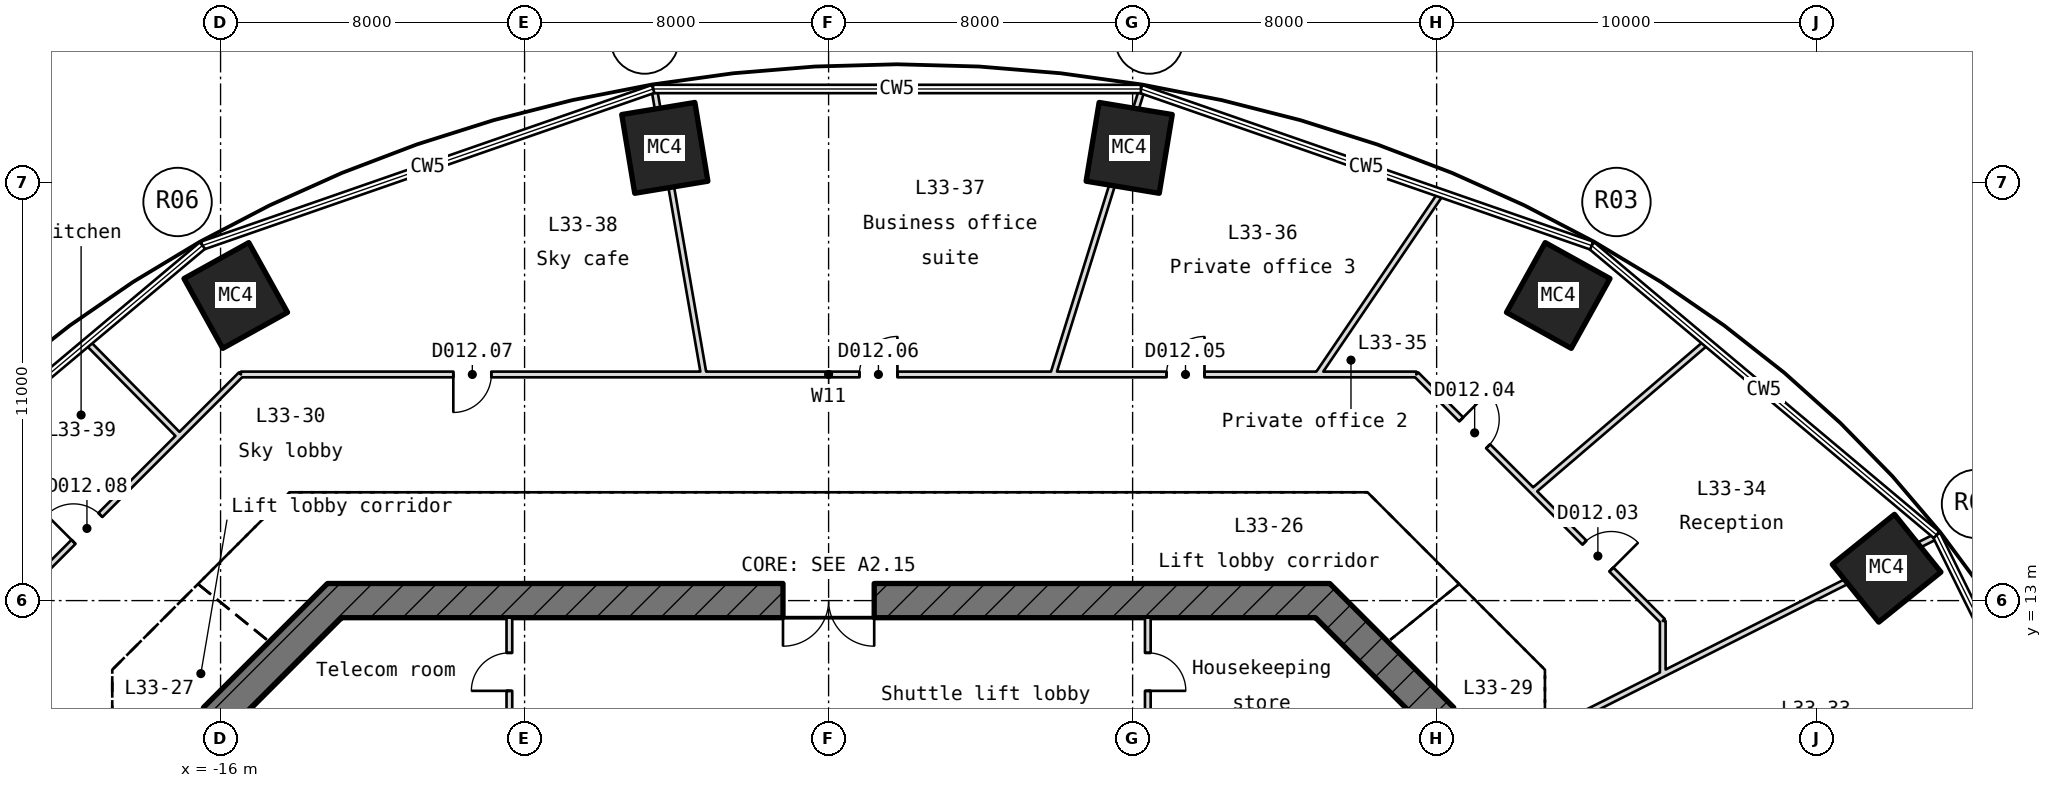
"""IFC4 building model, lengths in metres.
Left out: names, types, materials, properties, quantities, classifications, styles, units other than length and angle.
Written with IfcOpenShell. Run it as: python <this file> out.ifc"""

import sys

from ifc_helpers import new_model, si_unit, direction, frame, frame_2d, origin, origin_2d, place, context, subcontext, project, spatial, rectangle, hollow_rectangle, extrude, element, fill, save


model = new_model("IFC4")
c1 = context("Model", 3, precision=1e-05, world=origin(), true_north=direction((0.0, 1.0)))
c2 = subcontext(c1, "Body", "Model", "MODEL_VIEW")
j1 = project(units=[si_unit("LENGTHUNIT", "METRE"), si_unit("PLANEANGLEUNIT", "RADIAN")], contexts=[c1])
p1 = place(None, origin())
s1 = spatial("IfcSite", under=j1, at=p1, CompositionType="ELEMENT")
p2 = place(p1, origin())
s2 = spatial("IfcBuilding", under=s1, at=p2, CompositionType="ELEMENT")
p3 = place(p2, frame((0.0, 0.0, 155.65)))
s3 = spatial("IfcBuildingStorey", under=s2, at=p3, CompositionType="ELEMENT", Elevation=155.65)
for number, where, z_axis, x_axis in (
    (1, (27.841, 13.852, -0.25), (0.0, 0.0, 1.0), (0.627, -0.779, 0.0)),
    (2, (19.2, 21.028, -0.25), (0.0, 0.0, 1.0), (0.874, -0.485, 0.0)),
    (3, (7.91, 24.912, -0.25), (0.0, 0.0, 1.0), (0.987, -0.163, 0.0)),
    (4, (-4.31, 24.912, -0.25), (0.0, 0.0, 1.0), (0.987, 0.163, 0.0)),
    (5, (-15.6, 21.028, -0.25), (0.0, 0.0, 1.0), (0.874, 0.485, 0.0)),
):
    element("IfcColumn", number, at=place(p3, frame(where, z_axis=z_axis, x_axis=x_axis)), inside=s3, PredefinedType="COLUMN", context=c2, shape_type="SweptSolid", body=[
        extrude(hollow_rectangle(XDim=1.95, YDim=2.1, WallThickness=0.075, at=origin_2d()), origin(), (0.0, 0.0, 1.0), 5.47),
    ])
p4 = place(p3, frame((16.0, -10.186, -0.25), z_axis=(0.0, 0.0, 1.0), x_axis=(0.0, 1.0, 0.0)))
e6 = element("IfcWall", 6, at=p4, inside=s3, PredefinedType="SHEAR", context=c2, shape_type="SweptSolid", body=[
    extrude(rectangle(XDim=20.373, YDim=0.9, at=frame_2d((10.186, 0.0))), origin(), (0.0, 0.0, 1.0), 5.47),
])
p5 = place(p4, frame((8.986, 0.0, 0.25)))
e7 = element("IfcOpeningElement", 7, at=p5, cuts=e6, PredefinedType="OPENING", context=c2, shape_type="SweptSolid", body=[
    extrude(rectangle(XDim=2.4, YDim=2.1, at=frame_2d((1.2, 1.05))), frame((0.0, 0.46, 0.0), z_axis=(0.0, -1.0, 0.0), x_axis=(1.0, 0.0, 0.0)), (0.0, 0.0, 1.0), 0.92),
])
p6 = place(p4, frame((13.586, 0.0, 0.25)))
e8 = element("IfcOpeningElement", 8, at=p6, cuts=e6, PredefinedType="OPENING", context=c2, shape_type="SweptSolid", body=[
    extrude(rectangle(XDim=1.2, YDim=2.1, at=frame_2d((0.6, 1.05))), frame((0.0, 0.46, 0.0), z_axis=(0.0, -1.0, 0.0), x_axis=(1.0, 0.0, 0.0)), (0.0, 0.0, 1.0), 0.92),
])
p7 = place(p3, frame((16.132, 9.868, -0.25), z_axis=(0.0, 0.0, 1.0), x_axis=(-0.707106781187, 0.707106781187, 0.0)))
e9 = element("IfcWall", 9, at=p7, inside=s3, PredefinedType="SHEAR", context=c2, shape_type="SweptSolid", body=[
    extrude(rectangle(XDim=4.615, YDim=0.9, at=frame_2d((2.308, 0.0))), origin(), (0.0, 0.0, 1.0), 5.47),
])
p8 = place(p3, frame((13.186, 13.0, -0.25), z_axis=(0.0, 0.0, 1.0), x_axis=(-1.0, 0.0, 0.0)))
e10 = element("IfcWall", 10, at=p8, inside=s3, PredefinedType="SHEAR", context=c2, shape_type="SweptSolid", body=[
    extrude(rectangle(XDim=26.373, YDim=0.9, at=frame_2d((13.186, 0.0))), origin(), (0.0, 0.0, 1.0), 5.47),
])
p9 = place(p8, frame((11.986, 0.0, 0.25)))
e11 = element("IfcOpeningElement", 11, at=p9, cuts=e10, PredefinedType="OPENING", context=c2, shape_type="SweptSolid", body=[
    extrude(rectangle(XDim=2.4, YDim=2.1, at=frame_2d((1.2, 1.05))), frame((0.0, 0.46, 0.0), z_axis=(0.0, -1.0, 0.0), x_axis=(1.0, 0.0, 0.0)), (0.0, 0.0, 1.0), 0.92),
])
p10 = place(p3, frame((-12.868, 13.132, -0.25), z_axis=(0.0, 0.0, 1.0), x_axis=(-0.707106781187, -0.707106781187, 0.0)))
e12 = element("IfcWall", 12, at=p10, inside=s3, PredefinedType="SHEAR", context=c2, shape_type="SweptSolid", body=[
    extrude(rectangle(XDim=4.615, YDim=0.9, at=frame_2d((2.308, 0.0))), origin(), (0.0, 0.0, 1.0), 5.47),
])
p11 = place(p3, frame((-16.0, 10.186, -0.25), z_axis=(0.0, 0.0, 1.0), x_axis=(0.0, -1.0, 0.0)))
e13 = element("IfcWall", 13, at=p11, inside=s3, PredefinedType="SHEAR", context=c2, shape_type="SweptSolid", body=[
    extrude(rectangle(XDim=20.373, YDim=0.9, at=frame_2d((10.186, 0.0))), origin(), (0.0, 0.0, 1.0), 5.47),
])
p12 = place(p11, frame((8.986, 0.0, 0.25)))
e14 = element("IfcOpeningElement", 14, at=p12, cuts=e13, PredefinedType="OPENING", context=c2, shape_type="SweptSolid", body=[
    extrude(rectangle(XDim=2.4, YDim=2.1, at=frame_2d((1.2, 1.05))), frame((0.0, 0.46, 0.0), z_axis=(0.0, -1.0, 0.0), x_axis=(1.0, 0.0, 0.0)), (0.0, 0.0, 1.0), 0.92),
])
p13 = place(p11, frame((5.586, 0.0, 0.25)))
e15 = element("IfcOpeningElement", 15, at=p13, cuts=e13, PredefinedType="OPENING", context=c2, shape_type="SweptSolid", body=[
    extrude(rectangle(XDim=1.2, YDim=2.1, at=frame_2d((0.6, 1.05))), frame((0.0, 0.46, 0.0), z_axis=(0.0, -1.0, 0.0), x_axis=(1.0, 0.0, 0.0)), (0.0, 0.0, 1.0), 0.92),
])
p14 = place(p3, frame((-8.4, 9.7, 0.0), z_axis=(0.0, 0.0, 1.0), x_axis=(0.0, 1.0, 0.0)))
e16 = element("IfcWall", 16, at=p14, inside=s3, PredefinedType="PARTITIONING", context=c2, shape_type="SweptSolid", body=[
    extrude(rectangle(XDim=2.85, YDim=0.15, at=frame_2d((1.425, 0.0))), origin(), (0.0, 0.0, 1.0), 5.22),
])
p15 = place(p14, frame((0.925, 0.0, 0.0)))
e17 = element("IfcOpeningElement", 17, at=p15, cuts=e16, PredefinedType="OPENING", context=c2, shape_type="SweptSolid", body=[
    extrude(rectangle(XDim=1.0, YDim=2.1, at=frame_2d((0.5, 1.05))), frame((0.0, 0.085, 0.0), z_axis=(0.0, -1.0, 0.0), x_axis=(1.0, 0.0, 0.0)), (0.0, 0.0, 1.0), 0.17),
])
p16 = place(p3, frame((8.4, 9.7, 0.0), z_axis=(0.0, 0.0, 1.0), x_axis=(0.0, 1.0, 0.0)))
e18 = element("IfcWall", 18, at=p16, inside=s3, PredefinedType="PARTITIONING", context=c2, shape_type="SweptSolid", body=[
    extrude(rectangle(XDim=2.85, YDim=0.15, at=frame_2d((1.425, 0.0))), origin(), (0.0, 0.0, 1.0), 5.22),
])
p17 = place(p16, frame((0.925, 0.0, 0.0)))
e19 = element("IfcOpeningElement", 19, at=p17, cuts=e18, PredefinedType="OPENING", context=c2, shape_type="SweptSolid", body=[
    extrude(rectangle(XDim=1.0, YDim=2.1, at=frame_2d((0.5, 1.05))), frame((0.0, 0.085, 0.0), z_axis=(0.0, -1.0, 0.0), x_axis=(1.0, 0.0, 0.0)), (0.0, 0.0, 1.0), 0.17),
])
p18 = place(p3, frame((-15.465, 18.95, 0.0), z_axis=(0.0, 0.0, 1.0), x_axis=(1.0, 0.0, 0.0)))
e20 = element("IfcWall", 20, at=p18, inside=s3, PredefinedType="PARTITIONING", context=c2, shape_type="SweptSolid", body=[
    extrude(rectangle(XDim=30.929, YDim=0.15, at=frame_2d((15.465, 0.0))), origin(), (0.0, 0.0, 1.0), 5.22),
])
p19 = place(p18, frame((24.356, 0.0, 0.0)))
e21 = element("IfcOpeningElement", 21, at=p19, cuts=e20, PredefinedType="OPENING", context=c2, shape_type="SweptSolid", body=[
    extrude(rectangle(XDim=1.0, YDim=2.1, at=frame_2d((0.5, 1.05))), frame((0.0, 0.085, 0.0), z_axis=(0.0, -1.0, 0.0), x_axis=(1.0, 0.0, 0.0)), (0.0, 0.0, 1.0), 0.17),
])
p20 = place(p18, frame((16.276, 0.0, 0.0)))
e22 = element("IfcOpeningElement", 22, at=p20, cuts=e20, PredefinedType="OPENING", context=c2, shape_type="SweptSolid", body=[
    extrude(rectangle(XDim=1.0, YDim=2.1, at=frame_2d((0.5, 1.05))), frame((0.0, 0.085, 0.0), z_axis=(0.0, -1.0, 0.0), x_axis=(1.0, 0.0, 0.0)), (0.0, 0.0, 1.0), 0.17),
])
p21 = place(p18, frame((5.589, 0.0, 0.0)))
e23 = element("IfcOpeningElement", 23, at=p21, cuts=e20, PredefinedType="OPENING", context=c2, shape_type="SweptSolid", body=[
    extrude(rectangle(XDim=1.0, YDim=2.1, at=frame_2d((0.5, 1.05))), frame((0.0, 0.085, 0.0), z_axis=(0.0, -1.0, 0.0), x_axis=(1.0, 0.0, 0.0)), (0.0, 0.0, 1.0), 0.17),
])
p22 = place(p3, frame((18.85, 9.502, 0.0), z_axis=(0.0, 0.0, 1.0), x_axis=(0.892969898895, 0.450116384579, 0.0)))
e24 = element("IfcWall", 24, at=p22, inside=s3, PredefinedType="PARTITIONING", context=c2, shape_type="SweptSolid", body=[
    extrude(rectangle(XDim=9.412, YDim=0.15, at=frame_2d((4.706, 0.0))), origin(), (0.0, 0.0, 1.0), 4.608),
])
p23 = place(p3, frame((27.255, 13.738, 0.0), z_axis=(0.0, 0.0, 1.0), x_axis=(0.892996055484, 0.4500644897, 0.0)))
e25 = element("IfcWall", 25, at=p23, inside=s3, PredefinedType="PARTITIONING", context=c2, shape_type="SweptSolid", body=[
    extrude(rectangle(XDim=2.122, YDim=0.15, at=frame_2d((1.061, 0.0))), origin(), (0.0, 0.0, 1.0), 5.22),
])
p24 = place(p3, frame((18.536, 15.879, 0.0), z_axis=(0.0, 0.0, 1.0), x_axis=(0.759417316623, 0.650603826621, 0.0)))
e26 = element("IfcWall", 26, at=p24, inside=s3, PredefinedType="PARTITIONING", context=c2, shape_type="SweptSolid", body=[
    extrude(rectangle(XDim=6.004, YDim=0.15, at=frame_2d((3.002, 0.0))), origin(), (0.0, 0.0, 1.0), 5.22),
])
p25 = place(p3, frame((-21.95, 12.465, 0.0), z_axis=(0.0, 0.0, 1.0), x_axis=(0.707106781187, 0.707106781187, 0.0)))
e27 = element("IfcWall", 27, at=p25, inside=s3, PredefinedType="PARTITIONING", context=c2, shape_type="SweptSolid", body=[
    extrude(rectangle(XDim=9.172, YDim=0.15, at=frame_2d((4.586, 0.0))), origin(), (0.0, 0.0, 1.0), 5.22),
])
p26 = place(p25, frame((2.942, 0.0, 0.0)))
e28 = element("IfcOpeningElement", 28, at=p26, cuts=e27, PredefinedType="OPENING", context=c2, shape_type="SweptSolid", body=[
    extrude(rectangle(XDim=1.0, YDim=2.1, at=frame_2d((0.5, 1.05))), frame((0.0, 0.085, 0.0), z_axis=(0.0, -1.0, 0.0), x_axis=(1.0, 0.0, 0.0)), (0.0, 0.0, 1.0), 0.17),
])
p27 = place(p3, frame((12.875, 18.95, 0.0), z_axis=(0.0, 0.0, 1.0), x_axis=(0.561985643587, 0.827146985971, 0.0)))
e29 = element("IfcWall", 29, at=p27, inside=s3, PredefinedType="PARTITIONING", context=c2, shape_type="SweptSolid", body=[
    extrude(rectangle(XDim=5.744, YDim=0.15, at=frame_2d((2.872, 0.0))), origin(), (0.0, 0.0, 1.0), 5.22),
])
p28 = place(p3, frame((5.908, 18.95, 0.0), z_axis=(0.0, 0.0, 1.0), x_axis=(0.297612327445, 0.95468680862, 0.0)))
e30 = element("IfcWall", 30, at=p28, inside=s3, PredefinedType="PARTITIONING", context=c2, shape_type="SweptSolid", body=[
    extrude(rectangle(XDim=5.728, YDim=0.15, at=frame_2d((2.864, 0.0))), origin(), (0.0, 0.0, 1.0), 4.676),
])
p29 = place(p3, frame((7.613, 24.418, 0.0), z_axis=(0.0, 0.0, 1.0), x_axis=(0.297636028927, 0.95467941964, 0.0)))
e31 = element("IfcWall", 31, at=p29, inside=s3, PredefinedType="PARTITIONING", context=c2, shape_type="SweptSolid", body=[
    extrude(rectangle(XDim=2.111, YDim=0.15, at=frame_2d((1.055, 0.0))), origin(), (0.0, 0.0, 1.0), 5.22),
])
p30 = place(p3, frame((21.95, 11.064, 0.0), z_axis=(0.0, 0.0, 1.0), x_axis=(0.0, 1.0, 0.0)))
e32 = element("IfcWall", 32, at=p30, inside=s3, PredefinedType="PARTITIONING", context=c2, shape_type="SweptSolid", body=[
    extrude(rectangle(XDim=1.4, YDim=0.15, at=frame_2d((0.7, 0.0))), origin(), (0.0, 0.0, 1.0), 5.22),
])
p31 = place(p3, frame((-3.286, 18.95, 0.0), z_axis=(0.0, 0.0, 1.0), x_axis=(-0.170824075094, 0.9853015454, 0.0)))
e33 = element("IfcWall", 33, at=p31, inside=s3, PredefinedType="PARTITIONING", context=c2, shape_type="SweptSolid", body=[
    extrude(rectangle(XDim=5.5, YDim=0.15, at=frame_2d((2.75, 0.0))), origin(), (0.0, 0.0, 1.0), 4.676),
])
p32 = place(p3, frame((-4.225, 24.369, 0.0), z_axis=(0.0, 0.0, 1.0), x_axis=(-0.170792731179, 0.985306979056, 0.0)))
e34 = element("IfcWall", 34, at=p32, inside=s3, PredefinedType="PARTITIONING", context=c2, shape_type="SweptSolid", body=[
    extrude(rectangle(XDim=2.104, YDim=0.15, at=frame_2d((1.052, 0.0))), origin(), (0.0, 0.0, 1.0), 5.22),
])
p33 = place(p3, frame((-17.082, 17.333, 0.0), z_axis=(0.0, 0.0, 1.0), x_axis=(-0.701943933614, 0.712232205157, 0.0)))
e35 = element("IfcWall", 35, at=p33, inside=s3, PredefinedType="PARTITIONING", context=c2, shape_type="SweptSolid", body=[
    extrude(rectangle(XDim=3.441, YDim=0.15, at=frame_2d((1.72, 0.0))), origin(), (0.0, 0.0, 1.0), 5.22),
])
p34 = place(p3, frame((21.95, 12.465, 0.0), z_axis=(0.0, 0.0, 1.0), x_axis=(-0.707106781187, 0.707106781187, 0.0)))
e36 = element("IfcWall", 36, at=p34, inside=s3, PredefinedType="PARTITIONING", context=c2, shape_type="SweptSolid", body=[
    extrude(rectangle(XDim=9.172, YDim=0.15, at=frame_2d((4.586, 0.0))), origin(), (0.0, 0.0, 1.0), 5.22),
])
p35 = place(p34, frame((1.914, 0.0, 0.0)))
e37 = element("IfcOpeningElement", 37, at=p35, cuts=e36, PredefinedType="OPENING", context=c2, shape_type="SweptSolid", body=[
    extrude(rectangle(XDim=1.0, YDim=2.1, at=frame_2d((0.5, 1.05))), frame((0.0, 0.085, 0.0), z_axis=(0.0, -1.0, 0.0), x_axis=(1.0, 0.0, 0.0)), (0.0, 0.0, 1.0), 0.17),
])
p36 = place(p34, frame((6.5, 0.0, 0.0)))
e38 = element("IfcOpeningElement", 38, at=p36, cuts=e36, PredefinedType="OPENING", context=c2, shape_type="SweptSolid", body=[
    extrude(rectangle(XDim=1.0, YDim=2.1, at=frame_2d((0.5, 1.05))), frame((0.0, 0.085, 0.0), z_axis=(0.0, -1.0, 0.0), x_axis=(1.0, 0.0, 0.0)), (0.0, 0.0, 1.0), 0.17),
])
p37 = place(p3, frame((-18.85, 7.905, 0.0), z_axis=(0.0, 0.0, 1.0), x_axis=(-0.922196281158, 0.386722147049, 0.0)))
e39 = element("IfcWall", 39, at=p37, inside=s3, PredefinedType="PARTITIONING", context=c2, shape_type="SweptSolid", body=[
    extrude(rectangle(XDim=7.394, YDim=0.15, at=frame_2d((3.697, 0.0))), origin(), (0.0, 0.0, 1.0), 4.684),
])
p38 = place(p9, origin())
e40 = element("IfcDoor", 40, at=p38, inside=s3, OperationType="DOUBLE_DOOR_SINGLE_SWING", PredefinedType="DOOR", context=c2, shape_type="SweptSolid", body=[
    extrude(rectangle(XDim=2.4, YDim=2.1, at=frame_2d((1.2, 1.05))), frame((0.0, 0.025, 0.0), z_axis=(0.0, -1.0, 0.0), x_axis=(1.0, 0.0, 0.0)), (0.0, 0.0, 1.0), 0.05),
])
fill(e11, e40)
p39 = place(p15, origin())
e41 = element("IfcDoor", 41, at=p39, inside=s3, OperationType="SINGLE_SWING_RIGHT", PredefinedType="DOOR", context=c2, shape_type="SweptSolid", body=[
    extrude(rectangle(XDim=1.0, YDim=2.1, at=frame_2d((0.5, 1.05))), frame((0.0, 0.025, 0.0), z_axis=(0.0, -1.0, 0.0), x_axis=(1.0, 0.0, 0.0)), (0.0, 0.0, 1.0), 0.05),
])
fill(e17, e41)
p40 = place(p17, frame((1.0, 0.0, 0.0), z_axis=(0.0, 0.0, 1.0), x_axis=(-1.0, 0.0, 0.0)))
e42 = element("IfcDoor", 42, at=p40, inside=s3, OperationType="SINGLE_SWING_LEFT", PredefinedType="DOOR", context=c2, shape_type="SweptSolid", body=[
    extrude(rectangle(XDim=1.0, YDim=2.1, at=frame_2d((0.5, 1.05))), frame((0.0, 0.025, 0.0), z_axis=(0.0, -1.0, 0.0), x_axis=(1.0, 0.0, 0.0)), (0.0, 0.0, 1.0), 0.05),
])
fill(e19, e42)
p41 = place(p35, frame((1.0, 0.0, 0.0), z_axis=(0.0, 0.0, 1.0), x_axis=(-1.0, 0.0, 0.0)))
e43 = element("IfcDoor", 43, at=p41, inside=s3, OperationType="SINGLE_SWING_LEFT", PredefinedType="DOOR", context=c2, shape_type="SweptSolid", body=[
    extrude(rectangle(XDim=1.0, YDim=2.1, at=frame_2d((0.5, 1.05))), frame((0.0, 0.025, 0.0), z_axis=(0.0, -1.0, 0.0), x_axis=(1.0, 0.0, 0.0)), (0.0, 0.0, 1.0), 0.05),
])
fill(e37, e43)
p42 = place(p36, frame((1.0, 0.0, 0.0), z_axis=(0.0, 0.0, 1.0), x_axis=(-1.0, 0.0, 0.0)))
e44 = element("IfcDoor", 44, at=p42, inside=s3, OperationType="SINGLE_SWING_LEFT", PredefinedType="DOOR", context=c2, shape_type="SweptSolid", body=[
    extrude(rectangle(XDim=1.0, YDim=2.1, at=frame_2d((0.5, 1.05))), frame((0.0, 0.025, 0.0), z_axis=(0.0, -1.0, 0.0), x_axis=(1.0, 0.0, 0.0)), (0.0, 0.0, 1.0), 0.05),
])
fill(e38, e44)
p43 = place(p19, origin())
e45 = element("IfcDoor", 45, at=p43, inside=s3, OperationType="SINGLE_SWING_RIGHT", PredefinedType="DOOR", context=c2, shape_type="SweptSolid", body=[
    extrude(rectangle(XDim=1.0, YDim=2.1, at=frame_2d((0.5, 1.05))), frame((0.0, 0.025, 0.0), z_axis=(0.0, -1.0, 0.0), x_axis=(1.0, 0.0, 0.0)), (0.0, 0.0, 1.0), 0.05),
])
fill(e21, e45)
p44 = place(p20, origin())
e46 = element("IfcDoor", 46, at=p44, inside=s3, OperationType="SINGLE_SWING_RIGHT", PredefinedType="DOOR", context=c2, shape_type="SweptSolid", body=[
    extrude(rectangle(XDim=1.0, YDim=2.1, at=frame_2d((0.5, 1.05))), frame((0.0, 0.025, 0.0), z_axis=(0.0, -1.0, 0.0), x_axis=(1.0, 0.0, 0.0)), (0.0, 0.0, 1.0), 0.05),
])
fill(e22, e46)
p45 = place(p21, frame((1.0, 0.0, 0.0), z_axis=(0.0, 0.0, 1.0), x_axis=(-1.0, 0.0, 0.0)))
e47 = element("IfcDoor", 47, at=p45, inside=s3, OperationType="SINGLE_SWING_LEFT", PredefinedType="DOOR", context=c2, shape_type="SweptSolid", body=[
    extrude(rectangle(XDim=1.0, YDim=2.1, at=frame_2d((0.5, 1.05))), frame((0.0, 0.025, 0.0), z_axis=(0.0, -1.0, 0.0), x_axis=(1.0, 0.0, 0.0)), (0.0, 0.0, 1.0), 0.05),
])
fill(e23, e47)
p46 = place(p26, origin())
e48 = element("IfcDoor", 48, at=p46, inside=s3, OperationType="SINGLE_SWING_RIGHT", PredefinedType="DOOR", context=c2, shape_type="SweptSolid", body=[
    extrude(rectangle(XDim=1.0, YDim=2.1, at=frame_2d((0.5, 1.05))), frame((0.0, 0.025, 0.0), z_axis=(0.0, -1.0, 0.0), x_axis=(1.0, 0.0, 0.0)), (0.0, 0.0, 1.0), 0.05),
])
fill(e28, e48)
save(model, sys.argv[1])
